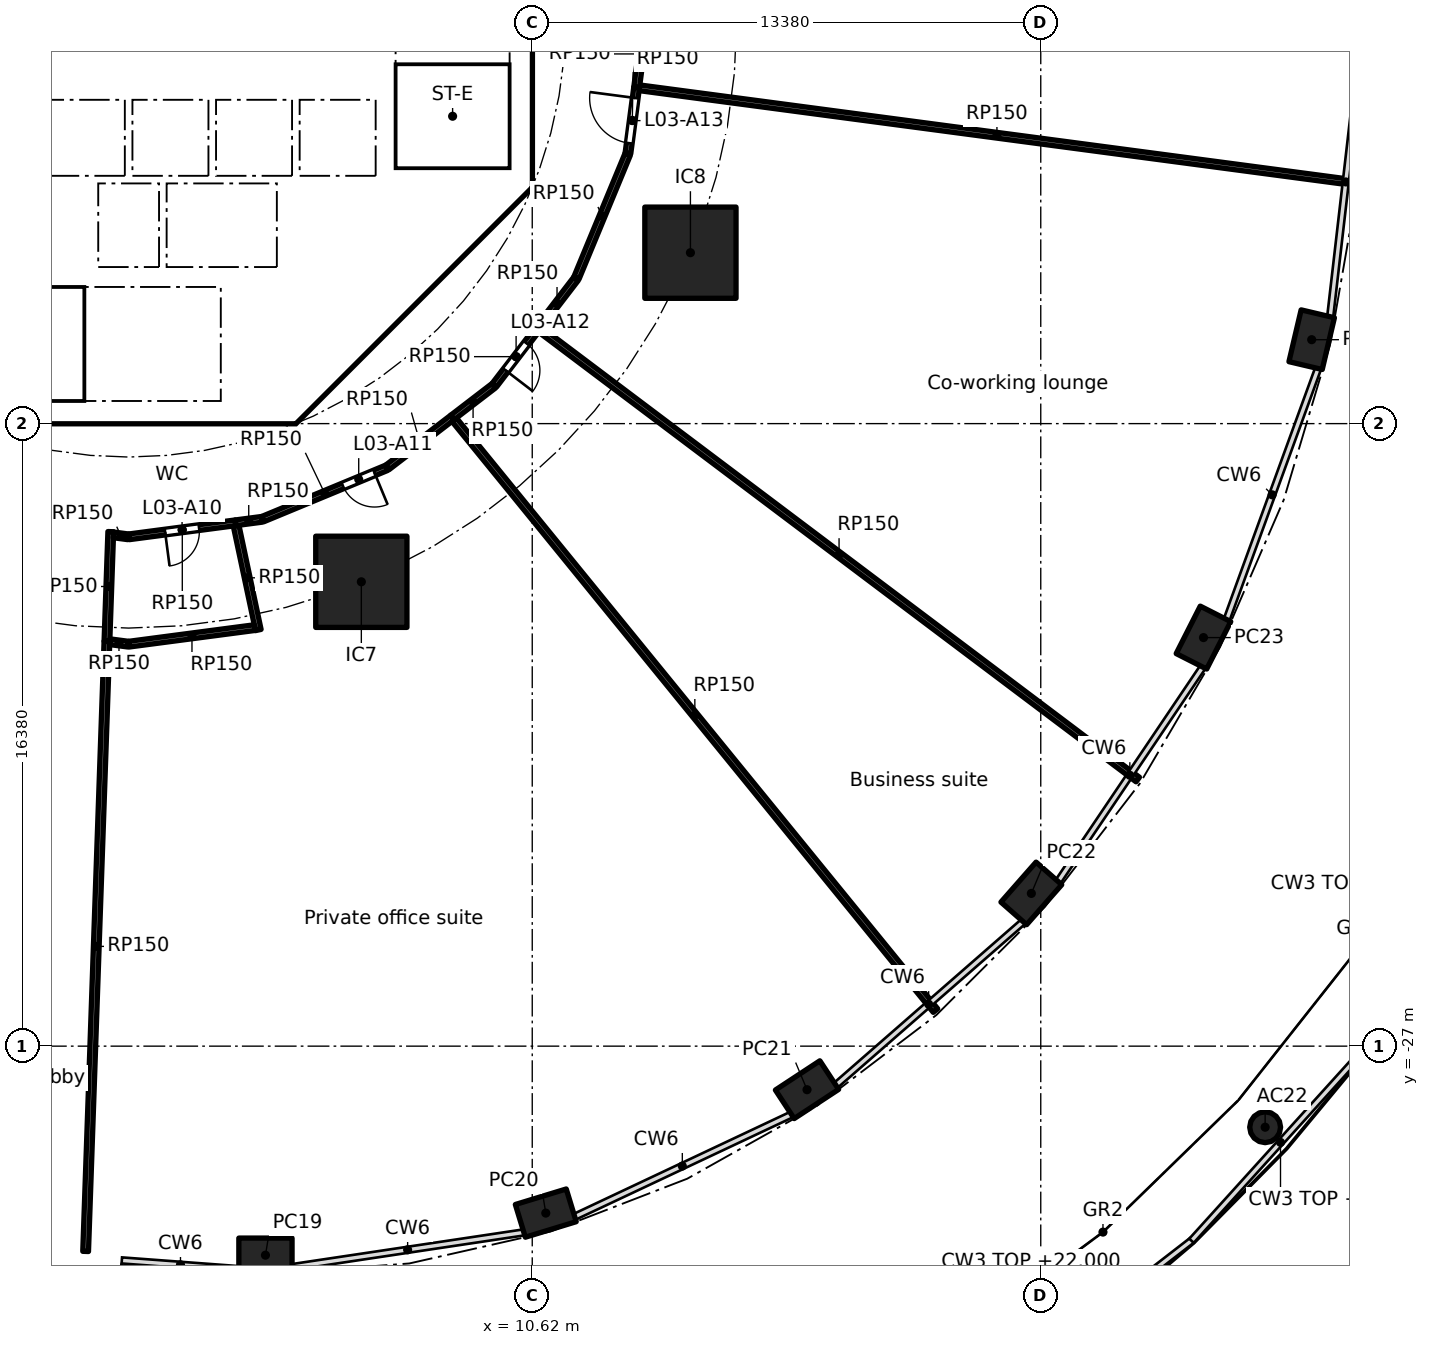
"""IFC4 building model, lengths in metres.
Left out: names, types, materials, properties, quantities, classifications, styles, units other than length and angle.
Written with IfcOpenShell. Run it as: python <this file> out.ifc"""

import sys

from ifc_helpers import new_model, si_unit, direction, frame, frame_2d, origin, origin_2d, place, context, subcontext, project, spatial, polyline, rectangle, hollow_rectangle, hollow_circle, outline, extrude, element, fill, save


model = new_model("IFC4")
c1 = context("Model", 3, precision=1e-05, world=origin(), true_north=direction((0.0, 1.0)))
c2 = subcontext(c1, "Body", "Model", "MODEL_VIEW")
j1 = project(units=[si_unit("LENGTHUNIT", "METRE"), si_unit("PLANEANGLEUNIT", "RADIAN")], contexts=[c1])
p1 = place(None, origin())
s1 = spatial("IfcSite", under=j1, at=p1, CompositionType="ELEMENT")
p2 = place(p1, origin())
s2 = spatial("IfcBuilding", under=s1, at=p2, CompositionType="ELEMENT")
p3 = place(p2, frame((0.0, 0.0, 17.0)))
s3 = spatial("IfcBuildingStorey", under=s2, at=p3, CompositionType="ELEMENT", Elevation=17.0)
for number, where, z_axis, x_axis in (
    (1, (3.6, -32.5, 0.0), (0.0, 0.0, 1.0), (1.0, 0.0, 0.0)),
    (2, (10.976, -31.393, 0.0), (0.0, 0.0, 1.0), (0.957, 0.292, 0.0)),
    (3, (17.85, -28.146, 0.0), (0.0, 0.0, 1.0), (0.836, 0.549, 0.0)),
    (4, (23.752, -22.981, 0.0), (0.0, 0.0, 1.0), (0.66, 0.751, 0.0)),
    (5, (28.282, -16.25, 0.0), (0.0, 0.0, 1.0), (0.452, 0.892, 0.0)),
    (6, (31.129, -8.412, 0.0), (0.0, 0.0, 1.0), (0.229, 0.973, 0.0)),
):
    element("IfcColumn", number, at=place(p3, frame(where, z_axis=z_axis, x_axis=x_axis)), inside=s3, PredefinedType="COLUMN", context=c2, shape_type="SweptSolid", body=[
        extrude(hollow_rectangle(XDim=1.4, YDim=0.9, WallThickness=0.05, at=origin_2d()), origin(), (0.0, 0.0, 1.0), 5.0),
    ])
for number, where, z_axis, x_axis in (
    (7, (6.123, -14.782, 0.0), (0.0, 0.0, 1.0), (1.0, 0.0, 0.0)),
    (8, (14.782, -6.123, 0.0), (0.0, 0.0, 1.0), (1.0, 0.0, 0.0)),
):
    element("IfcColumn", number, at=place(p3, frame(where, z_axis=z_axis, x_axis=x_axis)), inside=s3, PredefinedType="COLUMN", context=c2, shape_type="SweptSolid", body=[
        extrude(rectangle(XDim=2.4, YDim=2.4, at=origin_2d()), origin(), (0.0, 0.0, 1.0), 5.0),
    ])
p4 = place(p3, frame((29.904, -29.133, 0.0), z_axis=(0.0, 0.0, 1.0), x_axis=(1.0, 0.0, 0.0)))
e9 = element("IfcColumn", 9, at=p4, inside=s3, PredefinedType="COLUMN", context=c2, shape_type="SweptSolid", body=[
    extrude(hollow_circle(Radius=0.406, WallThickness=0.025, at=origin_2d()), origin(), (0.0, 0.0, 1.0), 5.0),
])
p5 = place(p3, frame((4.613, -9.988, 0.0), z_axis=(0.0, 0.0, 1.0), x_axis=(0.707106781187, 0.707106781187, 0.0)))
e10 = element("IfcWall", 10, at=p5, inside=s3, PredefinedType="SHEAR", context=c2, shape_type="SweptSolid", body=[
    extrude(rectangle(XDim=7.602, YDim=0.6, at=frame_2d((3.801, 0.0))), origin(), (0.0, 0.0, 1.0), 4.7),
])
p6 = place(p5, frame((3.201, 0.0, 0.0)))
e11 = element("IfcOpeningElement", 11, at=p6, cuts=e10, PredefinedType="OPENING", context=c2, shape_type="SweptSolid", body=[
    extrude(rectangle(XDim=1.2, YDim=2.1, at=frame_2d((0.6, 1.05))), frame((0.0, 0.31, 0.0), z_axis=(0.0, -1.0, 0.0), x_axis=(1.0, 0.0, 0.0)), (0.0, 0.0, 1.0), 0.62),
])
p7 = place(p3, frame((4.0, -10.025, 0.0), z_axis=(0.0, 0.0, 1.0), x_axis=(0.0, 1.0, 0.0)))
e12 = element("IfcWall", 12, at=p7, inside=s3, PredefinedType="SOLIDWALL", context=c2, shape_type="SweptSolid", body=[
    extrude(rectangle(XDim=3.0, YDim=0.2, at=frame_2d((1.5, 0.0))), origin(), (0.0, 0.0, 1.0), 4.7),
])
p8 = place(p7, frame((0.975, 0.0, 0.0)))
e13 = element("IfcOpeningElement", 13, at=p8, cuts=e12, PredefinedType="OPENING", context=c2, shape_type="SweptSolid", body=[
    extrude(rectangle(XDim=1.1, YDim=2.1, at=frame_2d((0.55, 1.05))), frame((0.0, 0.11, 0.0), z_axis=(0.0, -1.0, 0.0), x_axis=(1.0, 0.0, 0.0)), (0.0, 0.0, 1.0), 0.22),
])
p9 = place(p3, frame((4.0, -6.5, 0.0), z_axis=(0.0, 0.0, 1.0), x_axis=(0.0, 1.0, 0.0)))
e14 = element("IfcWall", 14, at=p9, inside=s3, PredefinedType="SOLIDWALL", context=c2, shape_type="SweptSolid", body=[
    extrude(rectangle(XDim=2.2, YDim=0.2, at=frame_2d((1.1, 0.0))), origin(), (0.0, 0.0, 1.0), 4.7),
])
p10 = place(p9, frame((0.55, 0.0, 0.0)))
e15 = element("IfcOpeningElement", 15, at=p10, cuts=e14, PredefinedType="OPENING", context=c2, shape_type="SweptSolid", body=[
    extrude(rectangle(XDim=1.1, YDim=2.1, at=frame_2d((0.55, 1.05))), frame((0.0, 0.11, 0.0), z_axis=(0.0, -1.0, 0.0), x_axis=(1.0, 0.0, 0.0)), (0.0, 0.0, 1.0), 0.22),
])
p11 = place(p3, frame((-6.7, -2.0, 0.0), z_axis=(0.0, 0.0, 1.0), x_axis=(1.0, 0.0, 0.0)))
e16 = element("IfcWall", 16, at=p11, inside=s3, PredefinedType="SOLIDWALL", context=c2, shape_type="SweptSolid", body=[
    extrude(rectangle(XDim=13.4, YDim=0.2, at=frame_2d((6.7, 0.0))), origin(), (0.0, 0.0, 1.0), 4.7),
])
p12 = place(p11, frame((0.65, 0.0, 0.0)))
e17 = element("IfcOpeningElement", 17, at=p12, cuts=e16, PredefinedType="OPENING", context=c2, shape_type="SweptSolid", body=[
    extrude(rectangle(XDim=1.1, YDim=2.1, at=frame_2d((0.55, 1.05))), frame((0.0, 0.11, 0.0), z_axis=(0.0, -1.0, 0.0), x_axis=(1.0, 0.0, 0.0)), (0.0, 0.0, 1.0), 0.22),
])
p13 = place(p11, frame((2.85, 0.0, 0.0)))
e18 = element("IfcOpeningElement", 18, at=p13, cuts=e16, PredefinedType="OPENING", context=c2, shape_type="SweptSolid", body=[
    extrude(rectangle(XDim=1.1, YDim=2.1, at=frame_2d((0.55, 1.05))), frame((0.0, 0.11, 0.0), z_axis=(0.0, -1.0, 0.0), x_axis=(1.0, 0.0, 0.0)), (0.0, 0.0, 1.0), 0.22),
])
p14 = place(p3, origin())
e19 = element("IfcWall", 19, at=p14, inside=s3, PredefinedType="SHEAR", context=c2, shape_type="SweptSolid", body=[
    extrude(outline(polyline([(-4.152, -10.025), (4.152, -10.025), (4.401, -9.776), (4.825, -10.2), (4.401, -10.625), (-4.401, -10.625), (-4.825, -10.2), (-4.401, -9.776), (-4.152, -10.025)])), origin(), (0.0, 0.0, 1.0), 4.7),
])
p15 = place(p3, origin())
e20 = element("IfcWall", 20, at=p15, inside=s3, PredefinedType="SHEAR", context=c2, shape_type="SweptSolid", body=[
    extrude(outline(polyline([(9.776, -4.401), (10.025, -4.152), (10.025, -3.801), (10.025, 4.152), (9.776, 4.401), (10.2, 4.825), (10.625, 4.401), (10.625, -4.401), (10.2, -4.825), (9.776, -4.401)])), origin(), (0.0, 0.0, 1.0), 4.7),
])
for number, where, z_axis, x_axis in (
    (21, (-0.9, -6.5, 0.0), (0.0, 0.0, 1.0), (0.0, 1.0, 0.0)),
    (22, (0.9, -6.5, 0.0), (0.0, 0.0, 1.0), (0.0, 1.0, 0.0)),
):
    element("IfcWall", number, at=place(p3, frame(where, z_axis=z_axis, x_axis=x_axis)), inside=s3, PredefinedType="SOLIDWALL", context=c2, shape_type="SweptSolid", body=[
        extrude(rectangle(XDim=2.2, YDim=0.2, at=frame_2d((1.1, 0.0))), origin(), (0.0, 0.0, 1.0), 4.7),
    ])
p16 = place(p3, origin())
e23 = element("IfcWall", 23, at=p16, inside=s3, PredefinedType="SOLIDWALL", context=c2, shape_type="SweptSolid", body=[
    extrude(outline(polyline([(-6.7, -2.1), (-6.5, -2.1), (-6.5, -4.1), (-4.5, -4.1), (-4.5, -2.1), (-4.3, -2.1), (-4.3, -4.1), (-2.3, -4.1), (-2.3, -2.1), (-2.1, -2.1), (-2.1, -4.1), (-0.1, -4.1), (-0.1, -2.1), (0.1, -2.1), (0.1, -4.1), (2.1, -4.1), (2.1, -2.1), (2.3, -2.1), (2.3, -4.1), (4.3, -4.1), (4.3, -2.1), (4.5, -2.1), (4.5, -4.1), (6.5, -4.1), (6.5, -2.1), (6.7, -2.1), (6.7, -4.3), (-6.7, -4.3), (-6.7, -2.1)])), origin(), (0.0, 0.0, 1.0), 4.7),
])
p17 = place(p3, origin())
e24 = element("IfcWall", 24, at=p17, inside=s3, PredefinedType="SOLIDWALL", context=c2, shape_type="SweptSolid", body=[
    extrude(outline(polyline([(4.1, -7.025), (-4.1, -7.025), (-4.1, -6.5), (4.1, -6.5), (4.1, -7.025)])), origin(), (0.0, 0.0, 1.0), 4.7),
])
p18 = place(p3, origin())
e25 = element("IfcWall", 25, at=p18, inside=s3, PredefinedType="SOLIDWALL", context=c2, shape_type="SweptSolid", body=[
    extrude(outline(polyline([(7.025, -3.9), (6.7, -3.9), (6.7, 3.9), (7.025, 3.9), (7.025, -3.9)])), origin(), (0.0, 0.0, 1.0), 4.7),
])
p19 = place(p3, origin())
e26 = element("IfcWall", 26, at=p19, inside=s3, PredefinedType="SOLIDWALL", context=c2, shape_type="SweptSolid", body=[
    extrude(outline(polyline([(10.025, -4.1), (6.7, -4.1), (6.7, -3.9), (10.025, -3.9), (10.025, -4.1)])), origin(), (0.0, 0.0, 1.0), 4.7),
])
p20 = place(p3, frame((-0.571, -16.349, 0.0), z_axis=(0.0, 0.0, 1.0), x_axis=(-0.034915122528, -0.999390281231, 0.0)))
e27 = element("IfcWall", 27, at=p20, inside=s3, PredefinedType="PARTITIONING", context=c2, shape_type="SweptSolid", body=[
    extrude(rectangle(XDim=16.062, YDim=0.15, at=frame_2d((8.031, 0.0))), origin(), (0.0, 0.0, 1.0), 4.7),
])
p21 = place(p3, frame((-0.47, -13.462, 0.0), z_axis=(0.0, 0.0, 1.0), x_axis=(-0.034907670303, -0.999390541557, 0.0)))
e28 = element("IfcWall", 28, at=p21, inside=s3, PredefinedType="PARTITIONING", context=c2, shape_type="SweptSolid", body=[
    extrude(rectangle(XDim=2.888, YDim=0.15, at=frame_2d((1.444, 0.0))), origin(), (0.0, 0.0, 1.0), 4.7),
])
p22 = place(p3, frame((-0.012, -16.423, 0.0), z_axis=(0.0, 0.0, 1.0), x_axis=(-0.991457697021, 0.130428658731, 0.0)))
e29 = element("IfcWall", 29, at=p22, inside=s3, PredefinedType="PARTITIONING", context=c2, shape_type="SweptSolid", body=[
    extrude(rectangle(XDim=0.489, YDim=0.15, at=frame_2d((0.244, 0.0))), origin(), (0.0, 0.0, 1.0), 4.7),
])
p23 = place(p3, frame((-0.012, -13.598, 0.0), z_axis=(0.0, 0.0, 1.0), x_axis=(-0.991467089631, 0.130357240609, 0.0)))
e30 = element("IfcWall", 30, at=p23, inside=s3, PredefinedType="PARTITIONING", context=c2, shape_type="SweptSolid", body=[
    extrude(rectangle(XDim=0.39, YDim=0.15, at=frame_2d((0.195, 0.0))), origin(), (0.0, 0.0, 1.0), 4.7),
])
p24 = place(p3, frame((2.812, -13.23, 0.0), z_axis=(0.0, 0.0, 1.0), x_axis=(-0.991445467051, -0.130521591565, 0.0)))
e31 = element("IfcWall", 31, at=p24, inside=s3, PredefinedType="PARTITIONING", context=c2, shape_type="SweptSolid", body=[
    extrude(rectangle(XDim=2.824, YDim=0.15, at=frame_2d((1.412, 0.0))), origin(), (0.0, 0.0, 1.0), 4.7),
])
p25 = place(p24, frame((0.968, 0.0, 0.0)))
e32 = element("IfcOpeningElement", 32, at=p25, cuts=e31, PredefinedType="OPENING", context=c2, shape_type="SweptSolid", body=[
    extrude(rectangle(XDim=0.9, YDim=2.1, at=frame_2d((0.45, 1.05))), frame((0.0, 0.085, 0.0), z_axis=(0.0, -1.0, 0.0), x_axis=(1.0, 0.0, 0.0)), (0.0, 0.0, 1.0), 0.17),
])
p26 = place(p3, frame((2.828, -13.303, 0.0), z_axis=(0.0, 0.0, 1.0), x_axis=(0.207920091501, -0.978145815076, 0.0)))
e33 = element("IfcWall", 33, at=p26, inside=s3, PredefinedType="PARTITIONING", context=c2, shape_type="SweptSolid", body=[
    extrude(rectangle(XDim=2.809, YDim=0.15, at=frame_2d((1.404, 0.0))), origin(), (0.0, 0.0, 1.0), 4.7),
])
p27 = place(p3, frame((3.321, -15.987, 0.0), z_axis=(0.0, 0.0, 1.0), x_axis=(-0.991441844339, -0.130549106827, 0.0)))
e34 = element("IfcWall", 34, at=p27, inside=s3, PredefinedType="PARTITIONING", context=c2, shape_type="SweptSolid", body=[
    extrude(rectangle(XDim=3.338, YDim=0.15, at=frame_2d((1.669, 0.0))), origin(), (0.0, 0.0, 1.0), 4.7),
])
p28 = place(p3, frame((3.508, -13.138, 0.0), z_axis=(0.0, 0.0, 1.0), x_axis=(-0.991460212813, -0.130409533429, 0.0)))
e35 = element("IfcWall", 35, at=p28, inside=s3, PredefinedType="PARTITIONING", context=c2, shape_type="SweptSolid", body=[
    extrude(rectangle(XDim=0.702, YDim=0.15, at=frame_2d((0.351, 0.0))), origin(), (0.0, 0.0, 1.0), 4.7),
])
p29 = place(p3, frame((6.789, -11.782, 0.0), z_axis=(0.0, 0.0, 1.0), x_axis=(-0.923881838111, -0.382677866108, 0.0)))
e36 = element("IfcWall", 36, at=p29, inside=s3, PredefinedType="PARTITIONING", context=c2, shape_type="SweptSolid", body=[
    extrude(rectangle(XDim=3.527, YDim=0.15, at=frame_2d((1.763, 0.0))), origin(), (0.0, 0.0, 1.0), 4.7),
])
p30 = place(p29, frame((0.346, 0.0, 0.0)))
e37 = element("IfcOpeningElement", 37, at=p30, cuts=e36, PredefinedType="OPENING", context=c2, shape_type="SweptSolid", body=[
    extrude(rectangle(XDim=0.9, YDim=2.1, at=frame_2d((0.45, 1.05))), frame((0.0, 0.085, 0.0), z_axis=(0.0, -1.0, 0.0), x_axis=(1.0, 0.0, 0.0)), (0.0, 0.0, 1.0), 0.17),
])
p31 = place(p3, frame((8.519, -10.459, 0.0), z_axis=(0.0, 0.0, 1.0), x_axis=(-0.793372937326, -0.608735888805, 0.0)))
e38 = element("IfcWall", 38, at=p31, inside=s3, PredefinedType="PARTITIONING", context=c2, shape_type="SweptSolid", body=[
    extrude(rectangle(XDim=2.155, YDim=0.15, at=frame_2d((1.078, 0.0))), origin(), (0.0, 0.0, 1.0), 4.7),
])
p32 = place(p3, frame((8.567, -10.517, 0.0), z_axis=(0.0, 0.0, 1.0), x_axis=(0.631550170727, -0.775335012658, 0.0)))
e39 = element("IfcWall", 39, at=p32, inside=s3, PredefinedType="PARTITIONING", context=c2, shape_type="SweptSolid", body=[
    extrude(rectangle(XDim=20.051, YDim=0.15, at=frame_2d((10.026, 0.0))), origin(), (0.0, 0.0, 1.0), 4.7),
])
p33 = place(p3, frame((9.607, -9.624, 0.0), z_axis=(0.0, 0.0, 1.0), x_axis=(-0.793371316762, -0.6087380009, 0.0)))
e40 = element("IfcWall", 40, at=p33, inside=s3, PredefinedType="PARTITIONING", context=c2, shape_type="SweptSolid", body=[
    extrude(rectangle(XDim=1.371, YDim=0.15, at=frame_2d((0.686, 0.0))), origin(), (0.0, 0.0, 1.0), 4.7),
])
p34 = place(p3, frame((10.774, -8.109, 0.0), z_axis=(0.0, 0.0, 1.0), x_axis=(-0.608754453805, -0.793358692504, 0.0)))
e41 = element("IfcWall", 41, at=p34, inside=s3, PredefinedType="PARTITIONING", context=c2, shape_type="SweptSolid", body=[
    extrude(rectangle(XDim=1.888, YDim=0.15, at=frame_2d((0.944, 0.0))), origin(), (0.0, 0.0, 1.0), 4.7),
])
p35 = place(p34, frame((0.5, 0.0, 0.0)))
e42 = element("IfcOpeningElement", 42, at=p35, cuts=e41, PredefinedType="OPENING", context=c2, shape_type="SweptSolid", body=[
    extrude(rectangle(XDim=0.9, YDim=2.1, at=frame_2d((0.45, 1.05))), frame((0.0, 0.085, 0.0), z_axis=(0.0, -1.0, 0.0), x_axis=(1.0, 0.0, 0.0)), (0.0, 0.0, 1.0), 0.17),
])
p36 = place(p3, frame((10.833, -8.154, 0.0), z_axis=(0.0, 0.0, 1.0), x_axis=(0.798984754133, -0.601351280586, 0.0)))
e43 = element("IfcWall", 43, at=p36, inside=s3, PredefinedType="PARTITIONING", context=c2, shape_type="SweptSolid", body=[
    extrude(rectangle(XDim=19.674, YDim=0.15, at=frame_2d((9.837, 0.0))), origin(), (0.0, 0.0, 1.0), 4.7),
])
p37 = place(p3, frame((11.771, -6.809, 0.0), z_axis=(0.0, 0.0, 1.0), x_axis=(-0.608716251771, -0.793388003961, 0.0)))
e44 = element("IfcWall", 44, at=p37, inside=s3, PredefinedType="PARTITIONING", context=c2, shape_type="SweptSolid", body=[
    extrude(rectangle(XDim=1.638, YDim=0.15, at=frame_2d((0.819, 0.0))), origin(), (0.0, 0.0, 1.0), 4.7),
])
p38 = place(p3, frame((13.132, -3.531, 0.0), z_axis=(0.0, 0.0, 1.0), x_axis=(-0.382677866108, -0.923881838111, 0.0)))
e45 = element("IfcWall", 45, at=p38, inside=s3, PredefinedType="PARTITIONING", context=c2, shape_type="SweptSolid", body=[
    extrude(rectangle(XDim=3.527, YDim=0.15, at=frame_2d((1.763, 0.0))), origin(), (0.0, 0.0, 1.0), 4.7),
])
p39 = place(p3, frame((13.366, -1.774, 0.0), z_axis=(0.0, 0.0, 1.0), x_axis=(-0.130526735914, -0.991444789795, 0.0)))
e46 = element("IfcWall", 46, at=p39, inside=s3, PredefinedType="PARTITIONING", context=c2, shape_type="SweptSolid", body=[
    extrude(rectangle(XDim=1.749, YDim=0.15, at=frame_2d((0.875, 0.0))), origin(), (0.0, 0.0, 1.0), 4.7),
])
p40 = place(p39, frame((0.281, 0.0, 0.0)))
e47 = element("IfcOpeningElement", 47, at=p40, cuts=e46, PredefinedType="OPENING", context=c2, shape_type="SweptSolid", body=[
    extrude(rectangle(XDim=1.2, YDim=2.1, at=frame_2d((0.6, 1.05))), frame((0.0, 0.085, 0.0), z_axis=(0.0, -1.0, 0.0), x_axis=(1.0, 0.0, 0.0)), (0.0, 0.0, 1.0), 0.17),
])
p41 = place(p3, frame((13.441, -1.784, 0.0), z_axis=(0.0, 0.0, 1.0), x_axis=(0.991305479384, -0.131580570535, 0.0)))
e48 = element("IfcWall", 48, at=p41, inside=s3, PredefinedType="PARTITIONING", context=c2, shape_type="SweptSolid", body=[
    extrude(rectangle(XDim=18.978, YDim=0.15, at=frame_2d((9.489, 0.0))), origin(), (0.0, 0.0, 1.0), 4.7),
])
p42 = place(p3, frame((13.598, -0.012, 0.0), z_axis=(0.0, 0.0, 1.0), x_axis=(-0.130472275964, -0.991451958092, 0.0)))
e49 = element("IfcWall", 49, at=p42, inside=s3, PredefinedType="PARTITIONING", context=c2, shape_type="SweptSolid", body=[
    extrude(rectangle(XDim=1.778, YDim=0.15, at=frame_2d((0.889, 0.0))), origin(), (0.0, 0.0, 1.0), 4.7),
])
p43 = place(p10, origin())
e50 = element("IfcDoor", 50, at=p43, inside=s3, OperationType="DOUBLE_DOOR_SLIDING", PredefinedType="DOOR", context=c2, shape_type="SweptSolid", body=[
    extrude(rectangle(XDim=1.1, YDim=2.1, at=frame_2d((0.55, 1.05))), frame((0.0, 0.025, 0.0), z_axis=(0.0, -1.0, 0.0), x_axis=(1.0, 0.0, 0.0)), (0.0, 0.0, 1.0), 0.05),
])
fill(e15, e50)
p44 = place(p8, origin())
e51 = element("IfcDoor", 51, at=p44, inside=s3, OperationType="SINGLE_SWING_RIGHT", PredefinedType="DOOR", context=c2, shape_type="SweptSolid", body=[
    extrude(rectangle(XDim=1.1, YDim=2.1, at=frame_2d((0.55, 1.05))), frame((0.0, 0.025, 0.0), z_axis=(0.0, -1.0, 0.0), x_axis=(1.0, 0.0, 0.0)), (0.0, 0.0, 1.0), 0.05),
])
fill(e13, e51)
p45 = place(p6, origin())
e52 = element("IfcDoor", 52, at=p45, inside=s3, OperationType="SINGLE_SWING_RIGHT", PredefinedType="DOOR", context=c2, shape_type="SweptSolid", body=[
    extrude(rectangle(XDim=1.2, YDim=2.1, at=frame_2d((0.6, 1.05))), frame((0.0, 0.025, 0.0), z_axis=(0.0, -1.0, 0.0), x_axis=(1.0, 0.0, 0.0)), (0.0, 0.0, 1.0), 0.05),
])
fill(e11, e52)
p46 = place(p25, origin())
e53 = element("IfcDoor", 53, at=p46, inside=s3, OperationType="SINGLE_SWING_RIGHT", PredefinedType="DOOR", context=c2, shape_type="SweptSolid", body=[
    extrude(rectangle(XDim=0.9, YDim=2.1, at=frame_2d((0.45, 1.05))), frame((0.0, 0.025, 0.0), z_axis=(0.0, -1.0, 0.0), x_axis=(1.0, 0.0, 0.0)), (0.0, 0.0, 1.0), 0.05),
])
fill(e32, e53)
p47 = place(p30, origin())
e54 = element("IfcDoor", 54, at=p47, inside=s3, OperationType="SINGLE_SWING_LEFT", PredefinedType="DOOR", context=c2, shape_type="SweptSolid", body=[
    extrude(rectangle(XDim=0.9, YDim=2.1, at=frame_2d((0.45, 1.05))), frame((0.0, 0.025, 0.0), z_axis=(0.0, -1.0, 0.0), x_axis=(1.0, 0.0, 0.0)), (0.0, 0.0, 1.0), 0.05),
])
fill(e37, e54)
p48 = place(p35, origin())
e55 = element("IfcDoor", 55, at=p48, inside=s3, OperationType="SINGLE_SWING_RIGHT", PredefinedType="DOOR", context=c2, shape_type="SweptSolid", body=[
    extrude(rectangle(XDim=0.9, YDim=2.1, at=frame_2d((0.45, 1.05))), frame((0.0, 0.025, 0.0), z_axis=(0.0, -1.0, 0.0), x_axis=(1.0, 0.0, 0.0)), (0.0, 0.0, 1.0), 0.05),
])
fill(e42, e55)
p49 = place(p40, frame((1.2, 0.0, 0.0), x_axis=(-1.0, 0.0, 0.0)))
e56 = element("IfcDoor", 56, at=p49, inside=s3, OperationType="SINGLE_SWING_RIGHT", PredefinedType="DOOR", context=c2, shape_type="SweptSolid", body=[
    extrude(rectangle(XDim=1.2, YDim=2.1, at=frame_2d((0.6, 1.05))), frame((0.0, 0.025, 0.0), z_axis=(0.0, -1.0, 0.0), x_axis=(1.0, 0.0, 0.0)), (0.0, 0.0, 1.0), 0.05),
])
fill(e47, e56)
save(model, sys.argv[1])
